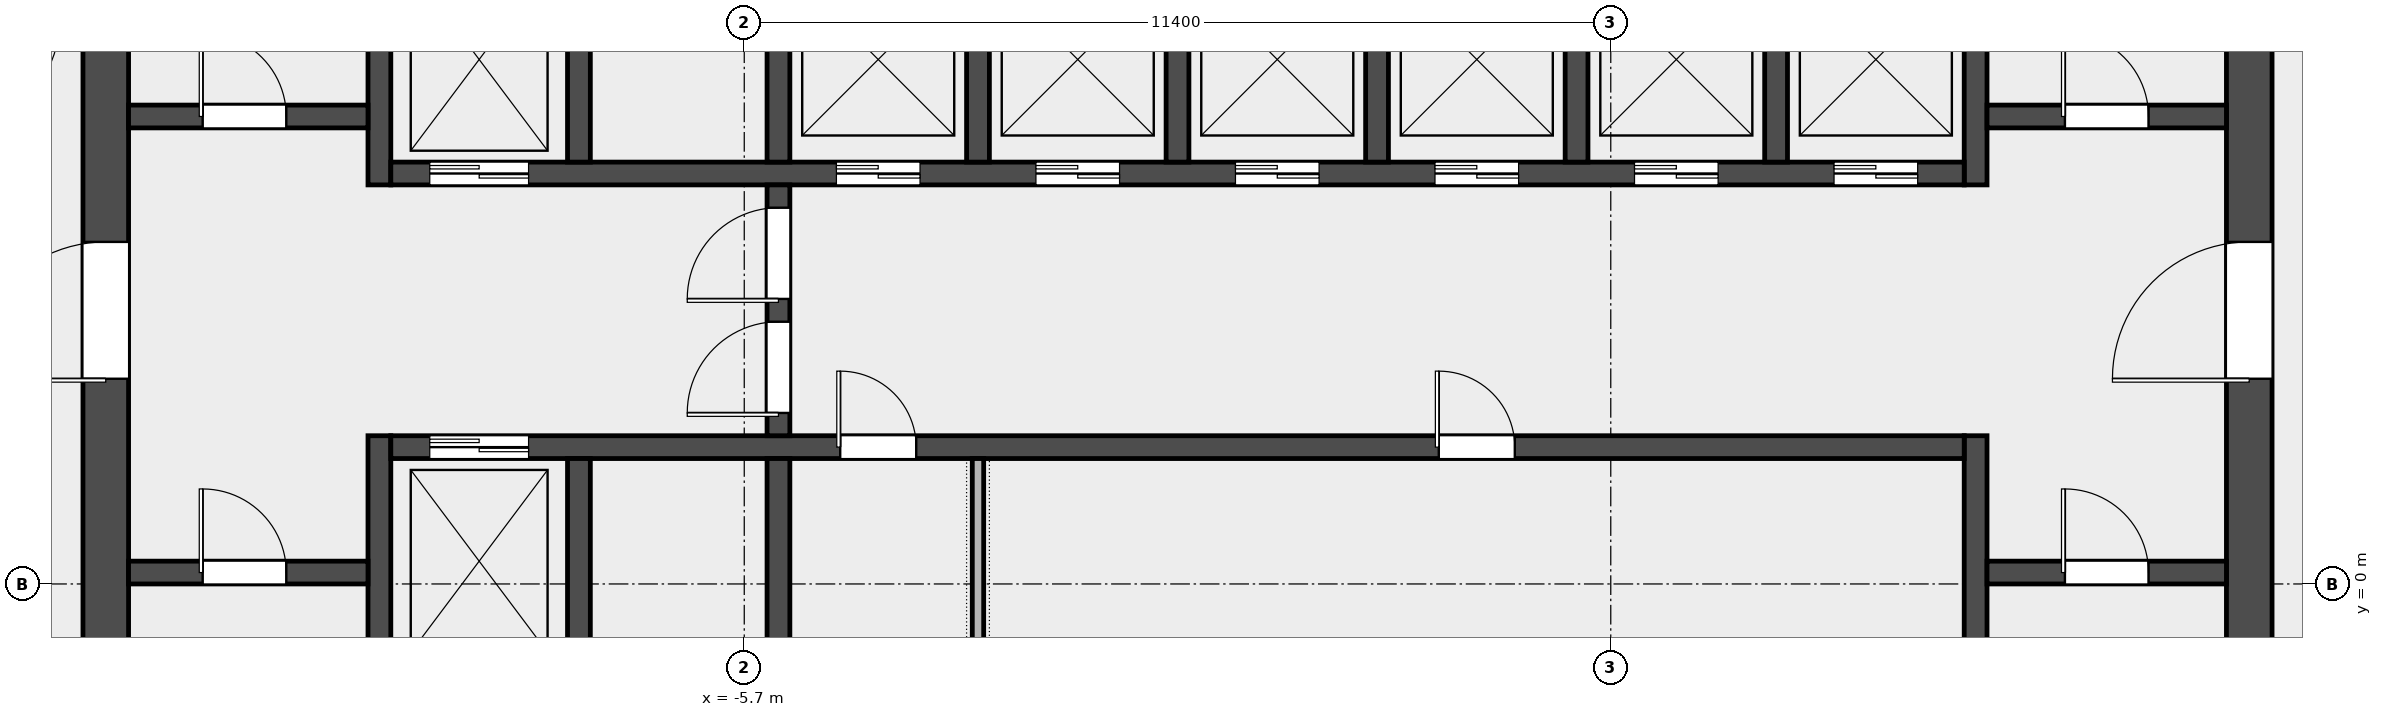
"""IFC4 building model, lengths in metres.
Left out: names, types, materials, properties, quantities, classifications, styles, units other than length and angle.
Written with IfcOpenShell. Run it as: python <this file> out.ifc"""

import sys

from ifc_helpers import new_model, si_unit, direction, frame, frame_2d, origin, place, context, subcontext, project, spatial, rectangle, extrude, element, fill, save


model = new_model("IFC4")
c1 = context("Model", 3, precision=1e-05, world=origin(), true_north=direction((0.0, 1.0)))
c2 = subcontext(c1, "Body", "Model", "MODEL_VIEW")
j1 = project(units=[si_unit("LENGTHUNIT", "METRE"), si_unit("PLANEANGLEUNIT", "RADIAN")], contexts=[c1])
p1 = place(None, origin())
s1 = spatial("IfcSite", under=j1, at=p1, CompositionType="ELEMENT")
p2 = place(p1, origin())
s2 = spatial("IfcBuilding", under=s1, at=p2, CompositionType="ELEMENT")
p3 = place(p2, frame((0.0, 0.0, 239.0)))
s3 = spatial("IfcBuildingStorey", under=s2, at=p3, CompositionType="ELEMENT", Elevation=239.0)
p4 = place(p3, frame((-14.1, -6.6, 0.0), z_axis=(0.0, 0.0, 1.0), x_axis=(0.0, 1.0, 0.0)))
e1 = element("IfcWall", 1, at=p4, inside=s3, PredefinedType="SHEAR", context=c2, shape_type="SweptSolid", body=[
    extrude(rectangle(XDim=19.5, YDim=0.6, at=frame_2d((9.75, 0.0))), origin(), (0.0, 0.0, 1.0), 3.7),
])
p5 = place(p4, frame((9.3, 0.0, 0.0)))
e2 = element("IfcOpeningElement", 2, at=p5, cuts=e1, PredefinedType="OPENING", context=c2, shape_type="SweptSolid", body=[
    extrude(rectangle(XDim=1.8, YDim=2.1, at=frame_2d((0.9, 1.05))), frame((0.0, 0.312, 0.0), z_axis=(0.0, -1.0, 0.0), x_axis=(1.0, 0.0, 0.0)), (0.0, 0.0, 1.0), 0.624),
])
p6 = place(p3, frame((14.1, -6.6, 0.0), z_axis=(0.0, 0.0, 1.0), x_axis=(0.0, 1.0, 0.0)))
e3 = element("IfcWall", 3, at=p6, inside=s3, PredefinedType="SHEAR", context=c2, shape_type="SweptSolid", body=[
    extrude(rectangle(XDim=19.5, YDim=0.6, at=frame_2d((9.75, 0.0))), origin(), (0.0, 0.0, 1.0), 3.7),
])
p7 = place(p6, frame((9.3, 0.0, 0.0)))
e4 = element("IfcOpeningElement", 4, at=p7, cuts=e3, PredefinedType="OPENING", context=c2, shape_type="SweptSolid", body=[
    extrude(rectangle(XDim=1.8, YDim=2.1, at=frame_2d((0.9, 1.05))), frame((0.0, 0.312, 0.0), z_axis=(0.0, -1.0, 0.0), x_axis=(1.0, 0.0, 0.0)), (0.0, 0.0, 1.0), 0.624),
])
p8 = place(p3, frame((-10.5, -6.6, 0.0), z_axis=(0.0, 0.0, 1.0), x_axis=(0.0, 1.0, 0.0)))
e5 = element("IfcWall", 5, at=p8, inside=s3, PredefinedType="SHEAR", context=c2, shape_type="SweptSolid", body=[
    extrude(rectangle(XDim=8.55, YDim=0.3, at=frame_2d((4.275, 0.0))), origin(), (0.0, 0.0, 1.0), 3.7),
])
p9 = place(p3, frame((-10.5, 5.25, 0.0), z_axis=(0.0, 0.0, 1.0), x_axis=(0.0, 1.0, 0.0)))
e6 = element("IfcWall", 6, at=p9, inside=s3, PredefinedType="SHEAR", context=c2, shape_type="SweptSolid", body=[
    extrude(rectangle(XDim=7.65, YDim=0.3, at=frame_2d((3.825, 0.0))), origin(), (0.0, 0.0, 1.0), 3.7),
])
p10 = place(p3, frame((10.5, -6.6, 0.0), z_axis=(0.0, 0.0, 1.0), x_axis=(0.0, 1.0, 0.0)))
e7 = element("IfcWall", 7, at=p10, inside=s3, PredefinedType="SHEAR", context=c2, shape_type="SweptSolid", body=[
    extrude(rectangle(XDim=8.55, YDim=0.3, at=frame_2d((4.275, 0.0))), origin(), (0.0, 0.0, 1.0), 3.7),
])
p11 = place(p3, frame((10.5, 5.25, 0.0), z_axis=(0.0, 0.0, 1.0), x_axis=(0.0, 1.0, 0.0)))
e8 = element("IfcWall", 8, at=p11, inside=s3, PredefinedType="SHEAR", context=c2, shape_type="SweptSolid", body=[
    extrude(rectangle(XDim=7.65, YDim=0.3, at=frame_2d((3.825, 0.0))), origin(), (0.0, 0.0, 1.0), 3.7),
])
p12 = place(p3, frame((-13.8, 0.15, 0.0), z_axis=(0.0, 0.0, 1.0), x_axis=(1.0, 0.0, 0.0)))
e9 = element("IfcWall", 9, at=p12, inside=s3, PredefinedType="SOLIDWALL", context=c2, shape_type="SweptSolid", body=[
    extrude(rectangle(XDim=3.15, YDim=0.3, at=frame_2d((1.575, 0.0))), origin(), (0.0, 0.0, 1.0), 3.7),
])
p13 = place(p12, frame((0.975, 0.0, 0.0)))
e10 = element("IfcOpeningElement", 10, at=p13, cuts=e9, PredefinedType="OPENING", context=c2, shape_type="SweptSolid", body=[
    extrude(rectangle(XDim=1.1, YDim=2.1, at=frame_2d((0.55, 1.05))), frame((0.0, 0.162, 0.0), z_axis=(0.0, -1.0, 0.0), x_axis=(1.0, 0.0, 0.0)), (0.0, 0.0, 1.0), 0.324),
])
p14 = place(p3, frame((-13.8, 6.15, 0.0), z_axis=(0.0, 0.0, 1.0), x_axis=(1.0, 0.0, 0.0)))
e11 = element("IfcWall", 11, at=p14, inside=s3, PredefinedType="SOLIDWALL", context=c2, shape_type="SweptSolid", body=[
    extrude(rectangle(XDim=3.15, YDim=0.3, at=frame_2d((1.575, 0.0))), origin(), (0.0, 0.0, 1.0), 3.7),
])
p15 = place(p14, frame((0.975, 0.0, 0.0)))
e12 = element("IfcOpeningElement", 12, at=p15, cuts=e11, PredefinedType="OPENING", context=c2, shape_type="SweptSolid", body=[
    extrude(rectangle(XDim=1.1, YDim=2.1, at=frame_2d((0.55, 1.05))), frame((0.0, 0.162, 0.0), z_axis=(0.0, -1.0, 0.0), x_axis=(1.0, 0.0, 0.0)), (0.0, 0.0, 1.0), 0.324),
])
p16 = place(p3, frame((10.65, 0.15, 0.0), z_axis=(0.0, 0.0, 1.0), x_axis=(1.0, 0.0, 0.0)))
e13 = element("IfcWall", 13, at=p16, inside=s3, PredefinedType="SOLIDWALL", context=c2, shape_type="SweptSolid", body=[
    extrude(rectangle(XDim=3.15, YDim=0.3, at=frame_2d((1.575, 0.0))), origin(), (0.0, 0.0, 1.0), 3.7),
])
p17 = place(p16, frame((1.025, 0.0, 0.0)))
e14 = element("IfcOpeningElement", 14, at=p17, cuts=e13, PredefinedType="OPENING", context=c2, shape_type="SweptSolid", body=[
    extrude(rectangle(XDim=1.1, YDim=2.1, at=frame_2d((0.55, 1.05))), frame((0.0, 0.162, 0.0), z_axis=(0.0, -1.0, 0.0), x_axis=(1.0, 0.0, 0.0)), (0.0, 0.0, 1.0), 0.324),
])
p18 = place(p3, frame((10.65, 6.15, 0.0), z_axis=(0.0, 0.0, 1.0), x_axis=(1.0, 0.0, 0.0)))
e15 = element("IfcWall", 15, at=p18, inside=s3, PredefinedType="SOLIDWALL", context=c2, shape_type="SweptSolid", body=[
    extrude(rectangle(XDim=3.15, YDim=0.3, at=frame_2d((1.575, 0.0))), origin(), (0.0, 0.0, 1.0), 3.7),
])
p19 = place(p18, frame((1.025, 0.0, 0.0)))
e16 = element("IfcOpeningElement", 16, at=p19, cuts=e15, PredefinedType="OPENING", context=c2, shape_type="SweptSolid", body=[
    extrude(rectangle(XDim=1.1, YDim=2.1, at=frame_2d((0.55, 1.05))), frame((0.0, 0.162, 0.0), z_axis=(0.0, -1.0, 0.0), x_axis=(1.0, 0.0, 0.0)), (0.0, 0.0, 1.0), 0.324),
])
p20 = place(p3, frame((-10.35, 1.8, 0.0), z_axis=(0.0, 0.0, 1.0), x_axis=(1.0, 0.0, 0.0)))
e17 = element("IfcWall", 17, at=p20, inside=s3, PredefinedType="SOLIDWALL", context=c2, shape_type="SweptSolid", body=[
    extrude(rectangle(XDim=20.7, YDim=0.3, at=frame_2d((10.35, 0.0))), origin(), (0.0, 0.0, 1.0), 3.7),
])
p21 = place(p20, frame((0.512, 0.0, 0.0)))
e18 = element("IfcOpeningElement", 18, at=p21, cuts=e17, PredefinedType="OPENING", context=c2, shape_type="SweptSolid", body=[
    extrude(rectangle(XDim=1.3, YDim=2.1, at=frame_2d((0.65, 1.05))), frame((0.0, 0.162, 0.0), z_axis=(0.0, -1.0, 0.0), x_axis=(1.0, 0.0, 0.0)), (0.0, 0.0, 1.0), 0.324),
])
p22 = place(p20, frame((5.913, 0.0, 0.0)))
e19 = element("IfcOpeningElement", 19, at=p22, cuts=e17, PredefinedType="OPENING", context=c2, shape_type="SweptSolid", body=[
    extrude(rectangle(XDim=1.0, YDim=2.1, at=frame_2d((0.5, 1.05))), frame((0.0, 0.162, 0.0), z_axis=(0.0, -1.0, 0.0), x_axis=(1.0, 0.0, 0.0)), (0.0, 0.0, 1.0), 0.324),
])
p23 = place(p20, frame((13.788, 0.0, 0.0)))
e20 = element("IfcOpeningElement", 20, at=p23, cuts=e17, PredefinedType="OPENING", context=c2, shape_type="SweptSolid", body=[
    extrude(rectangle(XDim=1.0, YDim=2.1, at=frame_2d((0.5, 1.05))), frame((0.0, 0.162, 0.0), z_axis=(0.0, -1.0, 0.0), x_axis=(1.0, 0.0, 0.0)), (0.0, 0.0, 1.0), 0.324),
])
p24 = place(p3, frame((-10.35, 5.4, 0.0), z_axis=(0.0, 0.0, 1.0), x_axis=(1.0, 0.0, 0.0)))
e21 = element("IfcWall", 21, at=p24, inside=s3, PredefinedType="SOLIDWALL", context=c2, shape_type="SweptSolid", body=[
    extrude(rectangle(XDim=20.7, YDim=0.3, at=frame_2d((10.35, 0.0))), origin(), (0.0, 0.0, 1.0), 3.7),
])
p25 = place(p24, frame((0.512, 0.0, 0.0)))
e22 = element("IfcOpeningElement", 22, at=p25, cuts=e21, PredefinedType="OPENING", context=c2, shape_type="SweptSolid", body=[
    extrude(rectangle(XDim=1.3, YDim=2.1, at=frame_2d((0.65, 1.05))), frame((0.0, 0.162, 0.0), z_axis=(0.0, -1.0, 0.0), x_axis=(1.0, 0.0, 0.0)), (0.0, 0.0, 1.0), 0.324),
])
p26 = place(p24, frame((5.863, 0.0, 0.0)))
e23 = element("IfcOpeningElement", 23, at=p26, cuts=e21, PredefinedType="OPENING", context=c2, shape_type="SweptSolid", body=[
    extrude(rectangle(XDim=1.1, YDim=2.1, at=frame_2d((0.55, 1.05))), frame((0.0, 0.162, 0.0), z_axis=(0.0, -1.0, 0.0), x_axis=(1.0, 0.0, 0.0)), (0.0, 0.0, 1.0), 0.324),
])
p27 = place(p24, frame((8.488, 0.0, 0.0)))
e24 = element("IfcOpeningElement", 24, at=p27, cuts=e21, PredefinedType="OPENING", context=c2, shape_type="SweptSolid", body=[
    extrude(rectangle(XDim=1.1, YDim=2.1, at=frame_2d((0.55, 1.05))), frame((0.0, 0.162, 0.0), z_axis=(0.0, -1.0, 0.0), x_axis=(1.0, 0.0, 0.0)), (0.0, 0.0, 1.0), 0.324),
])
p28 = place(p24, frame((11.113, 0.0, 0.0)))
e25 = element("IfcOpeningElement", 25, at=p28, cuts=e21, PredefinedType="OPENING", context=c2, shape_type="SweptSolid", body=[
    extrude(rectangle(XDim=1.1, YDim=2.1, at=frame_2d((0.55, 1.05))), frame((0.0, 0.162, 0.0), z_axis=(0.0, -1.0, 0.0), x_axis=(1.0, 0.0, 0.0)), (0.0, 0.0, 1.0), 0.324),
])
p29 = place(p24, frame((13.738, 0.0, 0.0)))
e26 = element("IfcOpeningElement", 26, at=p29, cuts=e21, PredefinedType="OPENING", context=c2, shape_type="SweptSolid", body=[
    extrude(rectangle(XDim=1.1, YDim=2.1, at=frame_2d((0.55, 1.05))), frame((0.0, 0.162, 0.0), z_axis=(0.0, -1.0, 0.0), x_axis=(1.0, 0.0, 0.0)), (0.0, 0.0, 1.0), 0.324),
])
p30 = place(p24, frame((16.363, 0.0, 0.0)))
e27 = element("IfcOpeningElement", 27, at=p30, cuts=e21, PredefinedType="OPENING", context=c2, shape_type="SweptSolid", body=[
    extrude(rectangle(XDim=1.1, YDim=2.1, at=frame_2d((0.55, 1.05))), frame((0.0, 0.162, 0.0), z_axis=(0.0, -1.0, 0.0), x_axis=(1.0, 0.0, 0.0)), (0.0, 0.0, 1.0), 0.324),
])
p31 = place(p24, frame((18.988, 0.0, 0.0)))
e28 = element("IfcOpeningElement", 28, at=p31, cuts=e21, PredefinedType="OPENING", context=c2, shape_type="SweptSolid", body=[
    extrude(rectangle(XDim=1.1, YDim=2.1, at=frame_2d((0.55, 1.05))), frame((0.0, 0.162, 0.0), z_axis=(0.0, -1.0, 0.0), x_axis=(1.0, 0.0, 0.0)), (0.0, 0.0, 1.0), 0.324),
])
for number, where, z_axis, x_axis in (
    (29, (-7.875, -1.05, 0.0), (0.0, 0.0, 1.0), (0.0, 1.0, 0.0)),
    (30, (-5.25, -1.05, 0.0), (0.0, 0.0, 1.0), (0.0, 1.0, 0.0)),
    (31, (-7.875, 5.55, 0.0), (0.0, 0.0, 1.0), (0.0, 1.0, 0.0)),
    (32, (-5.25, 5.55, 0.0), (0.0, 0.0, 1.0), (0.0, 1.0, 0.0)),
    (33, (-2.625, 5.55, 0.0), (0.0, 0.0, 1.0), (0.0, 1.0, 0.0)),
    (34, (0.0, 5.55, 0.0), (0.0, 0.0, 1.0), (0.0, 1.0, 0.0)),
    (35, (2.625, 5.55, 0.0), (0.0, 0.0, 1.0), (0.0, 1.0, 0.0)),
    (36, (5.25, 5.55, 0.0), (0.0, 0.0, 1.0), (0.0, 1.0, 0.0)),
    (37, (7.875, 5.55, 0.0), (0.0, 0.0, 1.0), (0.0, 1.0, 0.0)),
):
    element("IfcWall", number, at=place(p3, frame(where, z_axis=z_axis, x_axis=x_axis)), inside=s3, PredefinedType="SOLIDWALL", context=c2, shape_type="SweptSolid", body=[
        extrude(rectangle(XDim=2.7, YDim=0.3, at=frame_2d((1.35, 0.0))), origin(), (0.0, 0.0, 1.0), 3.7),
    ])
p32 = place(p3, frame((-5.25, 1.95, 0.0), z_axis=(0.0, 0.0, 1.0), x_axis=(0.0, 1.0, 0.0)))
e38 = element("IfcWall", 38, at=p32, inside=s3, PredefinedType="SOLIDWALL", context=c2, shape_type="SweptSolid", body=[
    extrude(rectangle(XDim=3.3, YDim=0.3, at=frame_2d((1.65, 0.0))), origin(), (0.0, 0.0, 1.0), 3.7),
])
p33 = place(p32, frame((0.3, 0.0, 0.0)))
e39 = element("IfcOpeningElement", 39, at=p33, cuts=e38, PredefinedType="OPENING", context=c2, shape_type="SweptSolid", body=[
    extrude(rectangle(XDim=1.2, YDim=2.1, at=frame_2d((0.6, 1.05))), frame((0.0, 0.162, 0.0), z_axis=(0.0, -1.0, 0.0), x_axis=(1.0, 0.0, 0.0)), (0.0, 0.0, 1.0), 0.324),
])
p34 = place(p32, frame((1.8, 0.0, 0.0)))
e40 = element("IfcOpeningElement", 40, at=p34, cuts=e38, PredefinedType="OPENING", context=c2, shape_type="SweptSolid", body=[
    extrude(rectangle(XDim=1.2, YDim=2.1, at=frame_2d((0.6, 1.05))), frame((0.0, 0.162, 0.0), z_axis=(0.0, -1.0, 0.0), x_axis=(1.0, 0.0, 0.0)), (0.0, 0.0, 1.0), 0.324),
])
p35 = place(p3, frame((-2.625, -1.05, 0.0), z_axis=(0.0, 0.0, 1.0), x_axis=(0.0, 1.0, 0.0)))
e41 = element("IfcWall", 41, at=p35, inside=s3, PredefinedType="PARTITIONING", context=c2, shape_type="SweptSolid", body=[
    extrude(rectangle(XDim=2.7, YDim=0.15, at=frame_2d((1.35, 0.0))), origin(), (0.0, 0.0, 1.0), 3.7),
])
p36 = place(p13, origin())
e42 = element("IfcDoor", 42, at=p36, inside=s3, OperationType="SINGLE_SWING_LEFT", PredefinedType="DOOR", context=c2, shape_type="SweptSolid", body=[
    extrude(rectangle(XDim=1.1, YDim=2.1, at=frame_2d((0.55, 1.05))), frame((0.0, 0.025, 0.0), z_axis=(0.0, -1.0, 0.0), x_axis=(1.0, 0.0, 0.0)), (0.0, 0.0, 1.0), 0.05),
])
fill(e10, e42)
p37 = place(p15, origin())
e43 = element("IfcDoor", 43, at=p37, inside=s3, OperationType="SINGLE_SWING_LEFT", PredefinedType="DOOR", context=c2, shape_type="SweptSolid", body=[
    extrude(rectangle(XDim=1.1, YDim=2.1, at=frame_2d((0.55, 1.05))), frame((0.0, 0.025, 0.0), z_axis=(0.0, -1.0, 0.0), x_axis=(1.0, 0.0, 0.0)), (0.0, 0.0, 1.0), 0.05),
])
fill(e12, e43)
p38 = place(p17, origin())
e44 = element("IfcDoor", 44, at=p38, inside=s3, OperationType="SINGLE_SWING_RIGHT", PredefinedType="DOOR", context=c2, shape_type="SweptSolid", body=[
    extrude(rectangle(XDim=1.1, YDim=2.1, at=frame_2d((0.55, 1.05))), frame((0.0, 0.025, 0.0), z_axis=(0.0, -1.0, 0.0), x_axis=(1.0, 0.0, 0.0)), (0.0, 0.0, 1.0), 0.05),
])
fill(e14, e44)
p39 = place(p19, origin())
e45 = element("IfcDoor", 45, at=p39, inside=s3, OperationType="SINGLE_SWING_RIGHT", PredefinedType="DOOR", context=c2, shape_type="SweptSolid", body=[
    extrude(rectangle(XDim=1.1, YDim=2.1, at=frame_2d((0.55, 1.05))), frame((0.0, 0.025, 0.0), z_axis=(0.0, -1.0, 0.0), x_axis=(1.0, 0.0, 0.0)), (0.0, 0.0, 1.0), 0.05),
])
fill(e16, e45)
p40 = place(p5, origin())
e46 = element("IfcDoor", 46, at=p40, inside=s3, OperationType="DOUBLE_DOOR_SINGLE_SWING", PredefinedType="DOOR", context=c2, shape_type="SweptSolid", body=[
    extrude(rectangle(XDim=1.8, YDim=2.1, at=frame_2d((0.9, 1.05))), frame((0.0, 0.025, 0.0), z_axis=(0.0, -1.0, 0.0), x_axis=(1.0, 0.0, 0.0)), (0.0, 0.0, 1.0), 0.05),
])
fill(e2, e46)
p41 = place(p7, origin())
e47 = element("IfcDoor", 47, at=p41, inside=s3, OperationType="DOUBLE_DOOR_SINGLE_SWING", PredefinedType="DOOR", context=c2, shape_type="SweptSolid", body=[
    extrude(rectangle(XDim=1.8, YDim=2.1, at=frame_2d((0.9, 1.05))), frame((0.0, 0.025, 0.0), z_axis=(0.0, -1.0, 0.0), x_axis=(1.0, 0.0, 0.0)), (0.0, 0.0, 1.0), 0.05),
])
fill(e4, e47)
p42 = place(p33, origin())
e48 = element("IfcDoor", 48, at=p42, inside=s3, OperationType="SINGLE_SWING_LEFT", PredefinedType="DOOR", context=c2, shape_type="SweptSolid", body=[
    extrude(rectangle(XDim=1.2, YDim=2.1, at=frame_2d((0.6, 1.05))), frame((0.0, 0.025, 0.0), z_axis=(0.0, -1.0, 0.0), x_axis=(1.0, 0.0, 0.0)), (0.0, 0.0, 1.0), 0.05),
])
fill(e39, e48)
p43 = place(p34, origin())
e49 = element("IfcDoor", 49, at=p43, inside=s3, OperationType="SINGLE_SWING_RIGHT", PredefinedType="DOOR", context=c2, shape_type="SweptSolid", body=[
    extrude(rectangle(XDim=1.2, YDim=2.1, at=frame_2d((0.6, 1.05))), frame((0.0, 0.025, 0.0), z_axis=(0.0, -1.0, 0.0), x_axis=(1.0, 0.0, 0.0)), (0.0, 0.0, 1.0), 0.05),
])
fill(e40, e49)
p44 = place(p21, origin())
e50 = element("IfcDoor", 50, at=p44, inside=s3, OperationType="DOUBLE_DOOR_SLIDING", PredefinedType="DOOR", context=c2, shape_type="SweptSolid", body=[
    extrude(rectangle(XDim=1.3, YDim=2.1, at=frame_2d((0.65, 1.05))), frame((0.0, 0.025, 0.0), z_axis=(0.0, -1.0, 0.0), x_axis=(1.0, 0.0, 0.0)), (0.0, 0.0, 1.0), 0.05),
])
fill(e18, e50)
p45 = place(p25, origin())
e51 = element("IfcDoor", 51, at=p45, inside=s3, OperationType="DOUBLE_DOOR_SLIDING", PredefinedType="DOOR", context=c2, shape_type="SweptSolid", body=[
    extrude(rectangle(XDim=1.3, YDim=2.1, at=frame_2d((0.65, 1.05))), frame((0.0, 0.025, 0.0), z_axis=(0.0, -1.0, 0.0), x_axis=(1.0, 0.0, 0.0)), (0.0, 0.0, 1.0), 0.05),
])
fill(e22, e51)
p46 = place(p26, origin())
e52 = element("IfcDoor", 52, at=p46, inside=s3, OperationType="DOUBLE_DOOR_SLIDING", PredefinedType="DOOR", context=c2, shape_type="SweptSolid", body=[
    extrude(rectangle(XDim=1.1, YDim=2.1, at=frame_2d((0.55, 1.05))), frame((0.0, 0.025, 0.0), z_axis=(0.0, -1.0, 0.0), x_axis=(1.0, 0.0, 0.0)), (0.0, 0.0, 1.0), 0.05),
])
fill(e23, e52)
p47 = place(p27, origin())
e53 = element("IfcDoor", 53, at=p47, inside=s3, OperationType="DOUBLE_DOOR_SLIDING", PredefinedType="DOOR", context=c2, shape_type="SweptSolid", body=[
    extrude(rectangle(XDim=1.1, YDim=2.1, at=frame_2d((0.55, 1.05))), frame((0.0, 0.025, 0.0), z_axis=(0.0, -1.0, 0.0), x_axis=(1.0, 0.0, 0.0)), (0.0, 0.0, 1.0), 0.05),
])
fill(e24, e53)
p48 = place(p28, origin())
e54 = element("IfcDoor", 54, at=p48, inside=s3, OperationType="DOUBLE_DOOR_SLIDING", PredefinedType="DOOR", context=c2, shape_type="SweptSolid", body=[
    extrude(rectangle(XDim=1.1, YDim=2.1, at=frame_2d((0.55, 1.05))), frame((0.0, 0.025, 0.0), z_axis=(0.0, -1.0, 0.0), x_axis=(1.0, 0.0, 0.0)), (0.0, 0.0, 1.0), 0.05),
])
fill(e25, e54)
p49 = place(p29, origin())
e55 = element("IfcDoor", 55, at=p49, inside=s3, OperationType="DOUBLE_DOOR_SLIDING", PredefinedType="DOOR", context=c2, shape_type="SweptSolid", body=[
    extrude(rectangle(XDim=1.1, YDim=2.1, at=frame_2d((0.55, 1.05))), frame((0.0, 0.025, 0.0), z_axis=(0.0, -1.0, 0.0), x_axis=(1.0, 0.0, 0.0)), (0.0, 0.0, 1.0), 0.05),
])
fill(e26, e55)
p50 = place(p30, origin())
e56 = element("IfcDoor", 56, at=p50, inside=s3, OperationType="DOUBLE_DOOR_SLIDING", PredefinedType="DOOR", context=c2, shape_type="SweptSolid", body=[
    extrude(rectangle(XDim=1.1, YDim=2.1, at=frame_2d((0.55, 1.05))), frame((0.0, 0.025, 0.0), z_axis=(0.0, -1.0, 0.0), x_axis=(1.0, 0.0, 0.0)), (0.0, 0.0, 1.0), 0.05),
])
fill(e27, e56)
p51 = place(p31, origin())
e57 = element("IfcDoor", 57, at=p51, inside=s3, OperationType="DOUBLE_DOOR_SLIDING", PredefinedType="DOOR", context=c2, shape_type="SweptSolid", body=[
    extrude(rectangle(XDim=1.1, YDim=2.1, at=frame_2d((0.55, 1.05))), frame((0.0, 0.025, 0.0), z_axis=(0.0, -1.0, 0.0), x_axis=(1.0, 0.0, 0.0)), (0.0, 0.0, 1.0), 0.05),
])
fill(e28, e57)
p52 = place(p22, origin())
e58 = element("IfcDoor", 58, at=p52, inside=s3, OperationType="SINGLE_SWING_LEFT", PredefinedType="DOOR", context=c2, shape_type="SweptSolid", body=[
    extrude(rectangle(XDim=1.0, YDim=2.1, at=frame_2d((0.5, 1.05))), frame((0.0, 0.025, 0.0), z_axis=(0.0, -1.0, 0.0), x_axis=(1.0, 0.0, 0.0)), (0.0, 0.0, 1.0), 0.05),
])
fill(e19, e58)
p53 = place(p23, origin())
e59 = element("IfcDoor", 59, at=p53, inside=s3, OperationType="SINGLE_SWING_LEFT", PredefinedType="DOOR", context=c2, shape_type="SweptSolid", body=[
    extrude(rectangle(XDim=1.0, YDim=2.1, at=frame_2d((0.5, 1.05))), frame((0.0, 0.025, 0.0), z_axis=(0.0, -1.0, 0.0), x_axis=(1.0, 0.0, 0.0)), (0.0, 0.0, 1.0), 0.05),
])
fill(e20, e59)
save(model, sys.argv[1])
